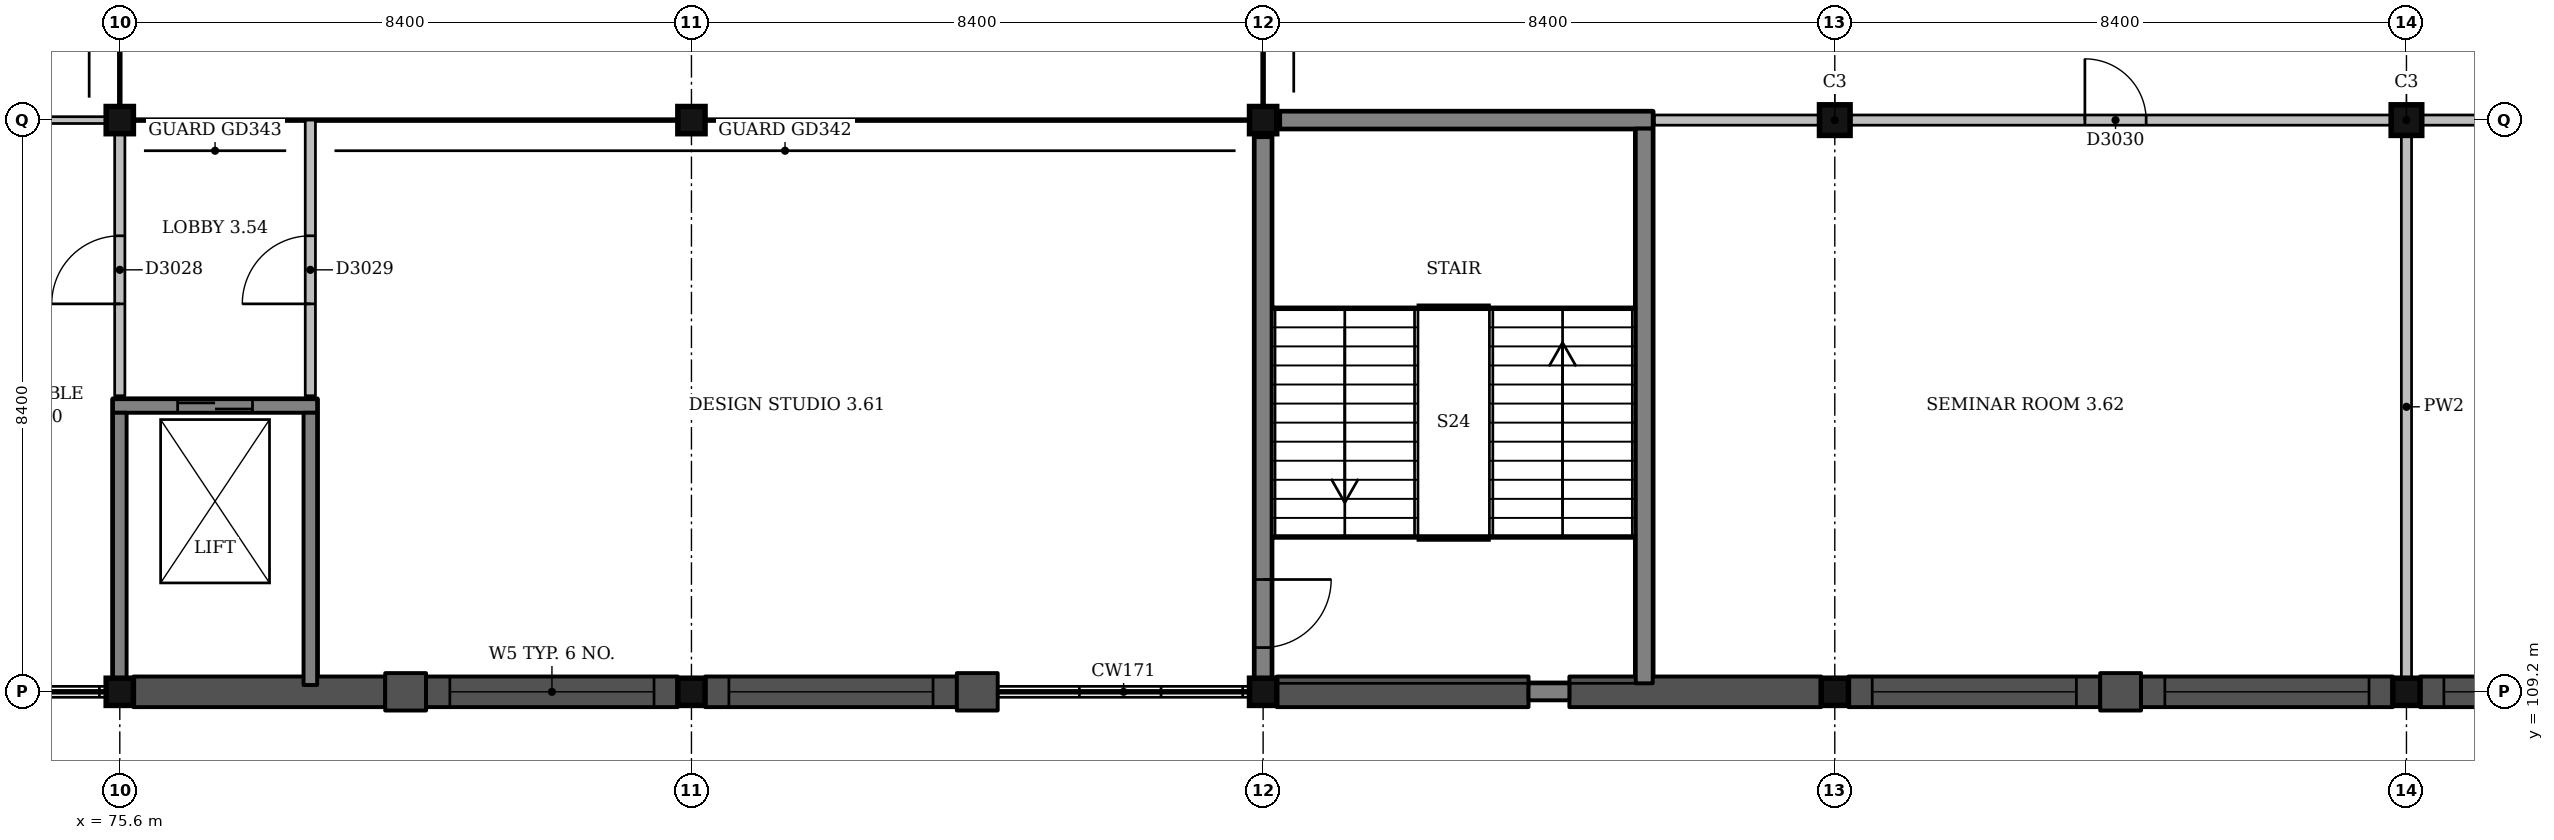
"""IFC4 building model, lengths in metres.
Left out: names, types, materials, properties, quantities, classifications, styles, units other than length and angle.
Written with IfcOpenShell. Run it as: python <this file> out.ifc"""

import sys

from ifc_helpers import new_model, si_unit, direction, frame, frame_2d, origin, origin_2d, place, context, subcontext, project, spatial, rectangle, extrude, element, fill, save


model = new_model("IFC4")
c1 = context("Model", 3, precision=1e-05, world=origin(), true_north=direction((0.0, 1.0)))
c2 = subcontext(c1, "Body", "Model", "MODEL_VIEW")
j1 = project(units=[si_unit("LENGTHUNIT", "METRE"), si_unit("PLANEANGLEUNIT", "RADIAN")], contexts=[c1])
p1 = place(None, origin())
s1 = spatial("IfcSite", under=j1, at=p1, CompositionType="ELEMENT")
p2 = place(p1, origin())
s2 = spatial("IfcBuilding", under=s1, at=p2, CompositionType="ELEMENT")
p3 = place(p2, frame((0.0, 0.0, 13.5)))
s3 = spatial("IfcBuildingStorey", under=s2, at=p3, CompositionType="ELEMENT", Elevation=13.5)
for number, where, z_axis, x_axis in (
    (1, (75.6, 109.2, 0.0), (0.0, 0.0, 1.0), (1.0, 0.0, 0.0)),
    (2, (75.6, 117.6, 0.0), (0.0, 0.0, 1.0), (1.0, 0.0, 0.0)),
    (3, (84.0, 109.2, 0.0), (0.0, 0.0, 1.0), (1.0, 0.0, 0.0)),
    (4, (84.0, 117.6, 0.0), (0.0, 0.0, 1.0), (1.0, 0.0, 0.0)),
    (5, (92.4, 109.2, 0.0), (0.0, 0.0, 1.0), (1.0, 0.0, 0.0)),
    (6, (92.4, 117.6, 0.0), (0.0, 0.0, 1.0), (1.0, 0.0, 0.0)),
    (7, (100.8, 109.2, 0.0), (0.0, 0.0, 1.0), (1.0, 0.0, 0.0)),
):
    element("IfcColumn", number, at=place(p3, frame(where, z_axis=z_axis, x_axis=x_axis)), inside=s3, PredefinedType="COLUMN", context=c2, shape_type="SweptSolid", body=[
        extrude(rectangle(XDim=0.4, YDim=0.4, at=origin_2d()), origin(), (0.0, 0.0, 1.0), 4.5),
    ])
p4 = place(p3, frame((100.8, 117.6, 0.0), z_axis=(0.0, 0.0, 1.0), x_axis=(1.0, 0.0, 0.0)))
e8 = element("IfcColumn", 8, at=p4, inside=s3, PredefinedType="COLUMN", context=c2, shape_type="SweptSolid", body=[
    extrude(rectangle(XDim=0.45, YDim=0.45, at=origin_2d()), origin(), (0.0, 0.0, 1.0), 4.5),
])
p5 = place(p3, frame((109.2, 109.2, 0.0), z_axis=(0.0, 0.0, 1.0), x_axis=(1.0, 0.0, 0.0)))
e9 = element("IfcColumn", 9, at=p5, inside=s3, PredefinedType="COLUMN", context=c2, shape_type="SweptSolid", body=[
    extrude(rectangle(XDim=0.4, YDim=0.4, at=origin_2d()), origin(), (0.0, 0.0, 1.0), 4.5),
])
p6 = place(p3, frame((109.2, 117.6, 0.0), z_axis=(0.0, 0.0, 1.0), x_axis=(1.0, 0.0, 0.0)))
e10 = element("IfcColumn", 10, at=p6, inside=s3, PredefinedType="COLUMN", context=c2, shape_type="SweptSolid", body=[
    extrude(rectangle(XDim=0.45, YDim=0.45, at=origin_2d()), origin(), (0.0, 0.0, 1.0), 4.5),
])
p7 = place(p3, frame((75.5, 113.4, 0.0), z_axis=(0.0, 0.0, 1.0), x_axis=(1.0, 0.0, 0.0)))
e11 = element("IfcWall", 11, at=p7, inside=s3, PredefinedType="SHEAR", context=c2, shape_type="SweptSolid", body=[
    extrude(rectangle(XDim=3.0, YDim=0.2, at=frame_2d((1.5, 0.0))), origin(), (0.0, 0.0, 1.0), 4.5),
])
p8 = place(p7, frame((0.95, 0.0, 0.0)))
e12 = element("IfcOpeningElement", 12, at=p8, cuts=e11, PredefinedType="OPENING", context=c2, shape_type="SweptSolid", body=[
    extrude(rectangle(XDim=1.1, YDim=2.1, at=frame_2d((0.55, 1.05))), frame((0.0, 0.11, 0.0), z_axis=(0.0, -1.0, 0.0), x_axis=(1.0, 0.0, 0.0)), (0.0, 0.0, 1.0), 0.22),
])
p9 = place(p3, frame((75.6, 109.4, 0.0), z_axis=(0.0, 0.0, 1.0), x_axis=(0.0, 1.0, 0.0)))
e13 = element("IfcWall", 13, at=p9, inside=s3, PredefinedType="SHEAR", context=c2, shape_type="SweptSolid", body=[
    extrude(rectangle(XDim=3.9, YDim=0.2, at=frame_2d((1.95, 0.0))), origin(), (0.0, 0.0, 1.0), 4.5),
])
p10 = place(p3, frame((78.4, 109.3, 0.0), z_axis=(0.0, 0.0, 1.0), x_axis=(0.0, 1.0, 0.0)))
e14 = element("IfcWall", 14, at=p10, inside=s3, PredefinedType="SHEAR", context=c2, shape_type="SweptSolid", body=[
    extrude(rectangle(XDim=4.0, YDim=0.2, at=frame_2d((2.0, 0.0))), origin(), (0.0, 0.0, 1.0), 4.5),
])
p11 = place(p3, frame((92.65, 117.6, 0.0), z_axis=(0.0, 0.0, 1.0), x_axis=(1.0, 0.0, 0.0)))
e15 = element("IfcWall", 15, at=p11, inside=s3, PredefinedType="SHEAR", context=c2, shape_type="SweptSolid", body=[
    extrude(rectangle(XDim=5.475, YDim=0.25, at=frame_2d((2.738, 0.0))), origin(), (0.0, 0.0, 1.0), 4.5),
])
p12 = place(p3, frame((92.4, 109.4, 0.0), z_axis=(0.0, 0.0, 1.0), x_axis=(0.0, 1.0, 0.0)))
e16 = element("IfcWall", 16, at=p12, inside=s3, PredefinedType="SHEAR", context=c2, shape_type="SweptSolid", body=[
    extrude(rectangle(XDim=7.95, YDim=0.25, at=frame_2d((3.975, 0.0))), origin(), (0.0, 0.0, 1.0), 4.5),
])
p13 = place(p12, frame((0.45, 0.0, 0.0)))
e17 = element("IfcOpeningElement", 17, at=p13, cuts=e16, PredefinedType="OPENING", context=c2, shape_type="SweptSolid", body=[
    extrude(rectangle(XDim=1.0, YDim=2.1, at=frame_2d((0.5, 1.05))), frame((0.0, 0.135, 0.0), z_axis=(0.0, -1.0, 0.0), x_axis=(1.0, 0.0, 0.0)), (0.0, 0.0, 1.0), 0.27),
])
p14 = place(p3, frame((98.0, 109.325, 0.0), z_axis=(0.0, 0.0, 1.0), x_axis=(0.0, 1.0, 0.0)))
e18 = element("IfcWall", 18, at=p14, inside=s3, PredefinedType="SHEAR", context=c2, shape_type="SweptSolid", body=[
    extrude(rectangle(XDim=8.15, YDim=0.25, at=frame_2d((4.075, 0.0))), origin(), (0.0, 0.0, 1.0), 4.5),
])
p15 = place(p3, frame((75.8, 109.2, 0.0), z_axis=(0.0, 0.0, 1.0), x_axis=(1.0, 0.0, 0.0)))
e19 = element("IfcWall", 19, at=p15, inside=s3, PredefinedType="SOLIDWALL", context=c2, shape_type="SweptSolid", body=[
    extrude(rectangle(XDim=3.7, YDim=0.45, at=frame_2d((1.85, 0.0))), origin(), (0.0, 0.0, 1.0), 3.45),
])
p16 = place(p3, frame((79.5, 109.2, 0.0), z_axis=(0.0, 0.0, 1.0), x_axis=(1.0, 0.0, 0.0)))
e20 = element("IfcWall", 20, at=p16, inside=s3, PredefinedType="SOLIDWALL", context=c2, shape_type="SweptSolid", body=[
    extrude(rectangle(XDim=0.6, YDim=0.55, at=frame_2d((0.3, 0.0))), origin(), (0.0, 0.0, 1.0), 3.45),
])
p17 = place(p3, frame((80.1, 109.2, 0.0), z_axis=(0.0, 0.0, 1.0), x_axis=(1.0, 0.0, 0.0)))
e21 = element("IfcWall", 21, at=p17, inside=s3, PredefinedType="SOLIDWALL", context=c2, shape_type="SweptSolid", body=[
    extrude(rectangle(XDim=3.7, YDim=0.45, at=frame_2d((1.85, 0.0))), origin(), (0.0, 0.0, 1.0), 3.45),
])
p18 = place(p17, frame((0.35, 0.0, 0.9)))
e22 = element("IfcOpeningElement", 22, at=p18, cuts=e21, PredefinedType="OPENING", context=c2, shape_type="SweptSolid", body=[
    extrude(rectangle(XDim=3.0, YDim=2.1, at=frame_2d((1.5, 1.05))), frame((0.0, 0.235, 0.0), z_axis=(0.0, -1.0, 0.0), x_axis=(1.0, 0.0, 0.0)), (0.0, 0.0, 1.0), 0.47),
])
p19 = place(p3, frame((84.2, 109.2, 0.0), z_axis=(0.0, 0.0, 1.0), x_axis=(1.0, 0.0, 0.0)))
e23 = element("IfcWall", 23, at=p19, inside=s3, PredefinedType="SOLIDWALL", context=c2, shape_type="SweptSolid", body=[
    extrude(rectangle(XDim=3.7, YDim=0.45, at=frame_2d((1.85, 0.0))), origin(), (0.0, 0.0, 1.0), 4.2),
])
p20 = place(p19, frame((0.35, 0.0, 0.9)))
e24 = element("IfcOpeningElement", 24, at=p20, cuts=e23, PredefinedType="OPENING", context=c2, shape_type="SweptSolid", body=[
    extrude(rectangle(XDim=3.0, YDim=2.1, at=frame_2d((1.5, 1.05))), frame((0.0, 0.235, 0.0), z_axis=(0.0, -1.0, 0.0), x_axis=(1.0, 0.0, 0.0)), (0.0, 0.0, 1.0), 0.47),
])
p21 = place(p3, frame((87.9, 109.2, 0.0), z_axis=(0.0, 0.0, 1.0), x_axis=(1.0, 0.0, 0.0)))
e25 = element("IfcWall", 25, at=p21, inside=s3, PredefinedType="SOLIDWALL", context=c2, shape_type="SweptSolid", body=[
    extrude(rectangle(XDim=0.6, YDim=0.55, at=frame_2d((0.3, 0.0))), origin(), (0.0, 0.0, 1.0), 4.2),
])
p22 = place(p3, frame((92.6, 109.2, 0.0), z_axis=(0.0, 0.0, 1.0), x_axis=(1.0, 0.0, 0.0)))
e26 = element("IfcWall", 26, at=p22, inside=s3, PredefinedType="SOLIDWALL", context=c2, shape_type="SweptSolid", body=[
    extrude(rectangle(XDim=3.7, YDim=0.45, at=frame_2d((1.85, 0.0))), origin(), (0.0, 0.0, 1.0), 3.45),
])
p23 = place(p3, frame((96.9, 109.2, 0.0), z_axis=(0.0, 0.0, 1.0), x_axis=(1.0, 0.0, 0.0)))
e27 = element("IfcWall", 27, at=p23, inside=s3, PredefinedType="SOLIDWALL", context=c2, shape_type="SweptSolid", body=[
    extrude(rectangle(XDim=3.7, YDim=0.45, at=frame_2d((1.85, 0.0))), origin(), (0.0, 0.0, 1.0), 3.45),
])
p24 = place(p3, frame((101.0, 109.2, 0.0), z_axis=(0.0, 0.0, 1.0), x_axis=(1.0, 0.0, 0.0)))
e28 = element("IfcWall", 28, at=p24, inside=s3, PredefinedType="SOLIDWALL", context=c2, shape_type="SweptSolid", body=[
    extrude(rectangle(XDim=3.7, YDim=0.45, at=frame_2d((1.85, 0.0))), origin(), (0.0, 0.0, 1.0), 3.45),
])
p25 = place(p24, frame((0.35, 0.0, 0.9)))
e29 = element("IfcOpeningElement", 29, at=p25, cuts=e28, PredefinedType="OPENING", context=c2, shape_type="SweptSolid", body=[
    extrude(rectangle(XDim=3.0, YDim=2.1, at=frame_2d((1.5, 1.05))), frame((0.0, 0.235, 0.0), z_axis=(0.0, -1.0, 0.0), x_axis=(1.0, 0.0, 0.0)), (0.0, 0.0, 1.0), 0.47),
])
p26 = place(p3, frame((104.7, 109.2, 0.0), z_axis=(0.0, 0.0, 1.0), x_axis=(1.0, 0.0, 0.0)))
e30 = element("IfcWall", 30, at=p26, inside=s3, PredefinedType="SOLIDWALL", context=c2, shape_type="SweptSolid", body=[
    extrude(rectangle(XDim=0.6, YDim=0.55, at=frame_2d((0.3, 0.0))), origin(), (0.0, 0.0, 1.0), 3.45),
])
p27 = place(p3, frame((105.3, 109.2, 0.0), z_axis=(0.0, 0.0, 1.0), x_axis=(1.0, 0.0, 0.0)))
e31 = element("IfcWall", 31, at=p27, inside=s3, PredefinedType="SOLIDWALL", context=c2, shape_type="SweptSolid", body=[
    extrude(rectangle(XDim=3.7, YDim=0.45, at=frame_2d((1.85, 0.0))), origin(), (0.0, 0.0, 1.0), 3.45),
])
p28 = place(p27, frame((0.35, 0.0, 0.9)))
e32 = element("IfcOpeningElement", 32, at=p28, cuts=e31, PredefinedType="OPENING", context=c2, shape_type="SweptSolid", body=[
    extrude(rectangle(XDim=3.0, YDim=2.1, at=frame_2d((1.5, 1.05))), frame((0.0, 0.235, 0.0), z_axis=(0.0, -1.0, 0.0), x_axis=(1.0, 0.0, 0.0)), (0.0, 0.0, 1.0), 0.47),
])
p29 = place(p3, frame((109.4, 109.2, 0.0), z_axis=(0.0, 0.0, 1.0), x_axis=(1.0, 0.0, 0.0)))
e33 = element("IfcWall", 33, at=p29, inside=s3, PredefinedType="SOLIDWALL", context=c2, shape_type="SweptSolid", body=[
    extrude(rectangle(XDim=3.7, YDim=0.45, at=frame_2d((1.85, 0.0))), origin(), (0.0, 0.0, 1.0), 3.45),
])
p30 = place(p29, frame((0.35, 0.0, 0.9)))
e34 = element("IfcOpeningElement", 34, at=p30, cuts=e33, PredefinedType="OPENING", context=c2, shape_type="SweptSolid", body=[
    extrude(rectangle(XDim=3.0, YDim=2.1, at=frame_2d((1.5, 1.05))), frame((0.0, 0.235, 0.0), z_axis=(0.0, -1.0, 0.0), x_axis=(1.0, 0.0, 0.0)), (0.0, 0.0, 1.0), 0.47),
])
p31 = place(p3, frame((98.15, 117.6, 0.0), z_axis=(0.0, 0.0, 1.0), x_axis=(1.0, 0.0, 0.0)))
e35 = element("IfcWall", 35, at=p31, inside=s3, PredefinedType="PARTITIONING", context=c2, shape_type="SweptSolid", body=[
    extrude(rectangle(XDim=2.425, YDim=0.15, at=frame_2d((1.212, 0.0))), origin(), (0.0, 0.0, 1.0), 3.6),
])
p32 = place(p3, frame((101.025, 117.6, 0.0), z_axis=(0.0, 0.0, 1.0), x_axis=(1.0, 0.0, 0.0)))
e36 = element("IfcWall", 36, at=p32, inside=s3, PredefinedType="PARTITIONING", context=c2, shape_type="SweptSolid", body=[
    extrude(rectangle(XDim=7.95, YDim=0.15, at=frame_2d((3.975, 0.0))), origin(), (0.0, 0.0, 1.0), 3.5),
])
p33 = place(p32, frame((3.45, 0.0, 0.0)))
e37 = element("IfcOpeningElement", 37, at=p33, cuts=e36, PredefinedType="OPENING", context=c2, shape_type="SweptSolid", body=[
    extrude(rectangle(XDim=0.9, YDim=2.1, at=frame_2d((0.45, 1.05))), frame((0.0, 0.085, 0.0), z_axis=(0.0, -1.0, 0.0), x_axis=(1.0, 0.0, 0.0)), (0.0, 0.0, 1.0), 0.17),
])
p34 = place(p3, frame((109.425, 117.6, 0.0), z_axis=(0.0, 0.0, 1.0), x_axis=(1.0, 0.0, 0.0)))
e38 = element("IfcWall", 38, at=p34, inside=s3, PredefinedType="PARTITIONING", context=c2, shape_type="SweptSolid", body=[
    extrude(rectangle(XDim=7.975, YDim=0.15, at=frame_2d((3.987, 0.0))), origin(), (0.0, 0.0, 1.0), 3.5),
])
p35 = place(p34, frame((3.45, 0.0, 0.0)))
e39 = element("IfcOpeningElement", 39, at=p35, cuts=e38, PredefinedType="OPENING", context=c2, shape_type="SweptSolid", body=[
    extrude(rectangle(XDim=0.9, YDim=2.1, at=frame_2d((0.45, 1.05))), frame((0.0, 0.085, 0.0), z_axis=(0.0, -1.0, 0.0), x_axis=(1.0, 0.0, 0.0)), (0.0, 0.0, 1.0), 0.17),
])
p36 = place(p3, frame((67.4, 117.6, 0.0), z_axis=(0.0, 0.0, 1.0), x_axis=(1.0, 0.0, 0.0)))
e40 = element("IfcWall", 40, at=p36, inside=s3, PredefinedType="PARTITIONING", context=c2, shape_type="SweptSolid", body=[
    extrude(rectangle(XDim=8.0, YDim=0.1, at=frame_2d((4.0, 0.0))), origin(), (0.0, 0.0, 1.0), 3.4),
])
p37 = place(p36, frame((2.9, 0.0, 0.0)))
e41 = element("IfcOpeningElement", 41, at=p37, cuts=e40, PredefinedType="OPENING", context=c2, shape_type="SweptSolid", body=[
    extrude(rectangle(XDim=0.9, YDim=2.1, at=frame_2d((0.45, 1.05))), frame((0.0, 0.06, 0.0), z_axis=(0.0, -1.0, 0.0), x_axis=(1.0, 0.0, 0.0)), (0.0, 0.0, 1.0), 0.12),
])
p38 = place(p3, frame((75.6, 113.55, 0.0), z_axis=(0.0, 0.0, 1.0), x_axis=(0.0, 1.0, 0.0)))
e42 = element("IfcWall", 42, at=p38, inside=s3, PredefinedType="PARTITIONING", context=c2, shape_type="SweptSolid", body=[
    extrude(rectangle(XDim=3.85, YDim=0.15, at=frame_2d((1.925, 0.0))), origin(), (0.0, 0.0, 1.0), 3.4),
])
p39 = place(p38, frame((1.35, 0.0, 0.0)))
e43 = element("IfcOpeningElement", 43, at=p39, cuts=e42, PredefinedType="OPENING", context=c2, shape_type="SweptSolid", body=[
    extrude(rectangle(XDim=1.0, YDim=2.1, at=frame_2d((0.5, 1.05))), frame((0.0, 0.085, 0.0), z_axis=(0.0, -1.0, 0.0), x_axis=(1.0, 0.0, 0.0)), (0.0, 0.0, 1.0), 0.17),
])
p40 = place(p3, frame((78.4, 113.55, 0.0), z_axis=(0.0, 0.0, 1.0), x_axis=(0.0, 1.0, 0.0)))
e44 = element("IfcWall", 44, at=p40, inside=s3, PredefinedType="PARTITIONING", context=c2, shape_type="SweptSolid", body=[
    extrude(rectangle(XDim=4.05, YDim=0.15, at=frame_2d((2.025, 0.0))), origin(), (0.0, 0.0, 1.0), 3.4),
])
p41 = place(p40, frame((1.35, 0.0, 0.0)))
e45 = element("IfcOpeningElement", 45, at=p41, cuts=e44, PredefinedType="OPENING", context=c2, shape_type="SweptSolid", body=[
    extrude(rectangle(XDim=1.0, YDim=2.1, at=frame_2d((0.5, 1.05))), frame((0.0, 0.085, 0.0), z_axis=(0.0, -1.0, 0.0), x_axis=(1.0, 0.0, 0.0)), (0.0, 0.0, 1.0), 0.17),
])
p42 = place(p3, frame((109.2, 109.4, 0.0), z_axis=(0.0, 0.0, 1.0), x_axis=(0.0, 1.0, 0.0)))
e46 = element("IfcWall", 46, at=p42, inside=s3, PredefinedType="PARTITIONING", context=c2, shape_type="SweptSolid", body=[
    extrude(rectangle(XDim=7.975, YDim=0.15, at=frame_2d((3.988, 0.0))), origin(), (0.0, 0.0, 1.0), 4.15),
])
p43 = place(p3, frame((96.3, 109.2, 0.0), z_axis=(0.0, 0.0, 1.0), x_axis=(1.0, 0.0, 0.0)))
e47 = element("IfcWall", 47, at=p43, inside=s3, PredefinedType="SHEAR", context=c2, shape_type="SweptSolid", body=[
    extrude(rectangle(XDim=0.6, YDim=0.25, at=frame_2d((0.3, 0.0))), origin(), (0.0, 0.0, 1.0), 4.5),
])
p44 = place(p18, origin())
e48 = element("IfcWindow", 48, at=p44, inside=s3, PartitioningType="SINGLE_PANEL", PredefinedType="WINDOW", context=c2, shape_type="SweptSolid", body=[
    extrude(rectangle(XDim=3.0, YDim=2.1, at=frame_2d((1.5, 1.05))), frame((0.0, 0.135, 0.0), z_axis=(0.0, -1.0, 0.0), x_axis=(1.0, 0.0, 0.0)), (0.0, 0.0, 1.0), 0.06),
])
fill(e22, e48)
p45 = place(p20, origin())
e49 = element("IfcWindow", 49, at=p45, inside=s3, PartitioningType="SINGLE_PANEL", PredefinedType="WINDOW", context=c2, shape_type="SweptSolid", body=[
    extrude(rectangle(XDim=3.0, YDim=2.1, at=frame_2d((1.5, 1.05))), frame((0.0, 0.135, 0.0), z_axis=(0.0, -1.0, 0.0), x_axis=(1.0, 0.0, 0.0)), (0.0, 0.0, 1.0), 0.06),
])
fill(e24, e49)
p46 = place(p25, origin())
e50 = element("IfcWindow", 50, at=p46, inside=s3, PartitioningType="SINGLE_PANEL", PredefinedType="WINDOW", context=c2, shape_type="SweptSolid", body=[
    extrude(rectangle(XDim=3.0, YDim=2.1, at=frame_2d((1.5, 1.05))), frame((0.0, 0.135, 0.0), z_axis=(0.0, -1.0, 0.0), x_axis=(1.0, 0.0, 0.0)), (0.0, 0.0, 1.0), 0.06),
])
fill(e29, e50)
p47 = place(p28, origin())
e51 = element("IfcWindow", 51, at=p47, inside=s3, PartitioningType="SINGLE_PANEL", PredefinedType="WINDOW", context=c2, shape_type="SweptSolid", body=[
    extrude(rectangle(XDim=3.0, YDim=2.1, at=frame_2d((1.5, 1.05))), frame((0.0, 0.135, 0.0), z_axis=(0.0, -1.0, 0.0), x_axis=(1.0, 0.0, 0.0)), (0.0, 0.0, 1.0), 0.06),
])
fill(e32, e51)
p48 = place(p30, origin())
e52 = element("IfcWindow", 52, at=p48, inside=s3, PartitioningType="SINGLE_PANEL", PredefinedType="WINDOW", context=c2, shape_type="SweptSolid", body=[
    extrude(rectangle(XDim=3.0, YDim=2.1, at=frame_2d((1.5, 1.05))), frame((0.0, 0.135, 0.0), z_axis=(0.0, -1.0, 0.0), x_axis=(1.0, 0.0, 0.0)), (0.0, 0.0, 1.0), 0.06),
])
fill(e34, e52)
p49 = place(p39, origin())
e53 = element("IfcDoor", 53, at=p49, inside=s3, OperationType="SINGLE_SWING_LEFT", PredefinedType="DOOR", context=c2, shape_type="SweptSolid", body=[
    extrude(rectangle(XDim=1.0, YDim=2.1, at=frame_2d((0.5, 1.05))), frame((0.0, 0.025, 0.0), z_axis=(0.0, -1.0, 0.0), x_axis=(1.0, 0.0, 0.0)), (0.0, 0.0, 1.0), 0.05),
])
fill(e43, e53)
p50 = place(p41, origin())
e54 = element("IfcDoor", 54, at=p50, inside=s3, OperationType="SINGLE_SWING_LEFT", PredefinedType="DOOR", context=c2, shape_type="SweptSolid", body=[
    extrude(rectangle(XDim=1.0, YDim=2.1, at=frame_2d((0.5, 1.05))), frame((0.0, 0.025, 0.0), z_axis=(0.0, -1.0, 0.0), x_axis=(1.0, 0.0, 0.0)), (0.0, 0.0, 1.0), 0.05),
])
fill(e45, e54)
p51 = place(p33, origin())
e55 = element("IfcDoor", 55, at=p51, inside=s3, OperationType="SINGLE_SWING_LEFT", PredefinedType="DOOR", context=c2, shape_type="SweptSolid", body=[
    extrude(rectangle(XDim=0.9, YDim=2.1, at=frame_2d((0.45, 1.05))), frame((0.0, 0.025, 0.0), z_axis=(0.0, -1.0, 0.0), x_axis=(1.0, 0.0, 0.0)), (0.0, 0.0, 1.0), 0.05),
])
fill(e37, e55)
p52 = place(p13, origin())
e56 = element("IfcDoor", 56, at=p52, inside=s3, OperationType="SINGLE_SWING_RIGHT", PredefinedType="DOOR", context=c2, shape_type="SweptSolid", body=[
    extrude(rectangle(XDim=1.0, YDim=2.1, at=frame_2d((0.5, 1.05))), frame((0.0, 0.025, 0.0), z_axis=(0.0, -1.0, 0.0), x_axis=(1.0, 0.0, 0.0)), (0.0, 0.0, 1.0), 0.05),
])
fill(e17, e56)
p53 = place(p8, origin())
e57 = element("IfcDoor", 57, at=p53, inside=s3, OperationType="SLIDING_TO_RIGHT", PredefinedType="DOOR", context=c2, shape_type="SweptSolid", body=[
    extrude(rectangle(XDim=1.1, YDim=2.1, at=frame_2d((0.55, 1.05))), frame((0.0, 0.025, 0.0), z_axis=(0.0, -1.0, 0.0), x_axis=(1.0, 0.0, 0.0)), (0.0, 0.0, 1.0), 0.05),
])
fill(e12, e57)
save(model, sys.argv[1])
